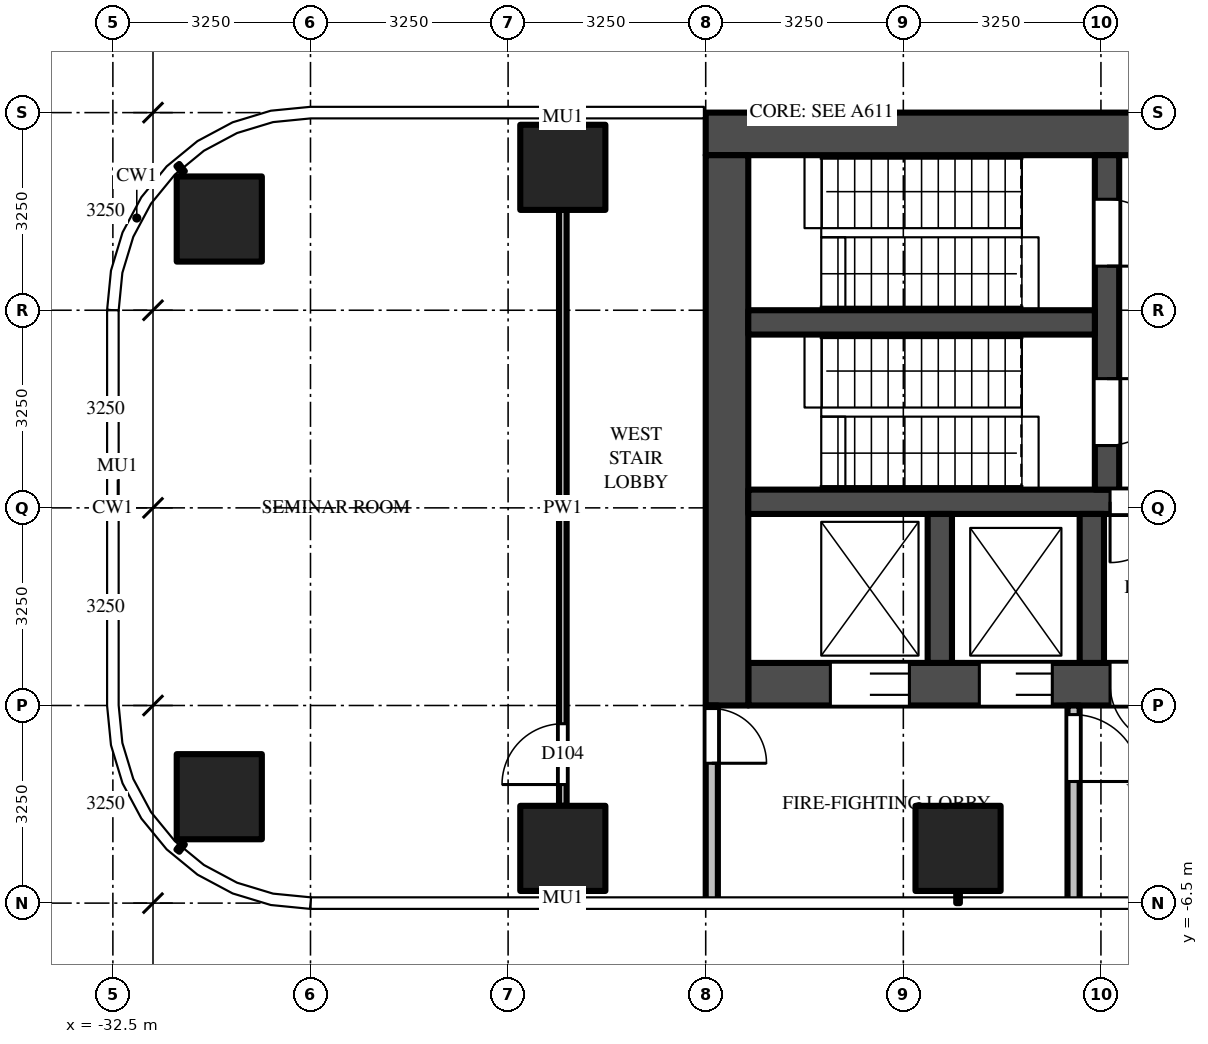
"""IFC4 building model, lengths in metres.
Left out: names, types, materials, properties, quantities, classifications, styles, units other than length and angle.
Written with IfcOpenShell. Run it as: python <this file> out.ifc"""

import sys

from ifc_helpers import new_model, si_unit, direction, frame, frame_2d, origin, origin_2d, place, context, subcontext, project, spatial, rectangle, extrude, source, transform, mapped, element, fill, save


model = new_model("IFC4")
c1 = context("Model", 3, precision=1e-05, world=origin(), true_north=direction((0.0, 1.0)))
c2 = subcontext(c1, "Body", "Model", "MODEL_VIEW")
j1 = project(units=[si_unit("LENGTHUNIT", "METRE"), si_unit("PLANEANGLEUNIT", "RADIAN")], contexts=[c1])
p1 = place(None, origin())
s1 = spatial("IfcSite", under=j1, at=p1, CompositionType="ELEMENT")
p2 = place(p1, origin())
s2 = spatial("IfcBuilding", under=s1, at=p2, CompositionType="ELEMENT")
p3 = place(p2, frame((0.0, 0.0, 88.0)))
s3 = spatial("IfcBuildingStorey", under=s2, at=p3, CompositionType="ELEMENT", Elevation=88.0)
m1 = source(origin(), c2, "Body", "SweptSolid", [
    extrude(rectangle(XDim=1.4, YDim=1.4, at=origin_2d()), origin(), (0.0, 0.0, 1.0), 4.5),
])
for number, where, z_axis, x_axis in (
    (1, (-18.6, -5.6, 0.0), (0.0, 0.0, 1.0), (1.0, 0.0, 0.0)),
    (2, (-25.1, -5.6, 0.0), (0.0, 0.0, 1.0), (1.0, 0.0, 0.0)),
    (3, (-30.75, -4.75, 0.0), (0.0, 0.0, 1.0), (1.0, 0.0, 0.0)),
    (4, (-25.1, 5.6, 0.0), (0.0, 0.0, 1.0), (1.0, 0.0, 0.0)),
    (5, (-30.75, 4.75, 0.0), (0.0, 0.0, 1.0), (1.0, 0.0, 0.0)),
):
    element("IfcColumn", number, at=place(p3, frame(where, z_axis=z_axis, x_axis=x_axis)), inside=s3, PredefinedType="COLUMN", context=c2, shape_type="MappedRepresentation", body=[
        mapped(m1, transform((0.0, 0.0, 0.0))),
    ])
m2 = source(origin(), c2, "Body", "SweptSolid", [
    extrude(rectangle(XDim=16.45, YDim=0.7, at=frame_2d((8.225, 0.0))), origin(), (0.0, 0.0, 1.0), 4.2),
])
p4 = place(p3, frame((-6.3, 6.15, 0.0), z_axis=(0.0, 0.0, 1.0), x_axis=(-1.0, 0.0, 0.0)))
e6 = element("IfcWall", 6, at=p4, inside=s3, PredefinedType="SHEAR", context=c2, shape_type="MappedRepresentation", body=[
    mapped(m2, transform((0.0, 0.0, 0.0))),
])
m3 = source(origin(), c2, "Body", "SweptSolid", [
    extrude(rectangle(XDim=14.85, YDim=0.7, at=frame_2d((7.425, 0.0))), origin(), (0.0, 0.0, 1.0), 4.2),
])
p5 = place(p3, frame((-7.2, -2.9, 0.0), z_axis=(0.0, 0.0, 1.0), x_axis=(-1.0, 0.0, 0.0)))
e7 = element("IfcWall", 7, at=p5, inside=s3, PredefinedType="SHEAR", context=c2, shape_type="MappedRepresentation", body=[
    mapped(m3, transform((0.0, 0.0, 0.0))),
])
m4 = source(origin(), c2, "Body", "SweptSolid", [
    extrude(rectangle(XDim=1.3, YDim=2.1, at=frame_2d((0.65, 1.05))), frame((0.0, 0.36, 0.0), z_axis=(0.0, -1.0, 0.0), x_axis=(1.0, 0.0, 0.0)), (0.0, 0.0, 1.0), 0.72),
])
p6 = place(p5, frame((12.2, 0.0, 0.0)))
e8 = element("IfcOpeningElement", 8, at=p6, cuts=e7, PredefinedType="OPENING", context=c2, shape_type="MappedRepresentation", body=[
    mapped(m4, transform((0.0, 0.0, 0.0))),
])
m5 = source(origin(), c2, "Body", "SweptSolid", [
    extrude(rectangle(XDim=1.2, YDim=2.1, at=frame_2d((0.6, 1.05))), frame((0.0, 0.36, 0.0), z_axis=(0.0, -1.0, 0.0), x_axis=(1.0, 0.0, 0.0)), (0.0, 0.0, 1.0), 0.72),
])
p7 = place(p5, frame((9.85, 0.0, 0.0)))
e9 = element("IfcOpeningElement", 9, at=p7, cuts=e7, PredefinedType="OPENING", context=c2, shape_type="MappedRepresentation", body=[
    mapped(m5, transform((0.0, 0.0, 0.0))),
])
m6 = source(origin(), c2, "Body", "SweptSolid", [
    extrude(rectangle(XDim=1.0, YDim=2.1, at=frame_2d((0.5, 1.05))), frame((0.0, 0.36, 0.0), z_axis=(0.0, -1.0, 0.0), x_axis=(1.0, 0.0, 0.0)), (0.0, 0.0, 1.0), 0.72),
])
p8 = place(p5, frame((7.9, 0.0, 0.0)))
e10 = element("IfcOpeningElement", 10, at=p8, cuts=e7, PredefinedType="OPENING", context=c2, shape_type="MappedRepresentation", body=[
    mapped(m6, transform((0.0, 0.0, 0.0))),
])
p9 = place(p5, frame((0.6, 0.0, 0.0)))
e11 = element("IfcOpeningElement", 11, at=p9, cuts=e7, PredefinedType="OPENING", context=c2, shape_type="MappedRepresentation", body=[
    mapped(m6, transform((0.0, 0.0, 0.0))),
])
m7 = source(origin(), c2, "Body", "SweptSolid", [
    extrude(rectangle(XDim=0.9, YDim=2.1, at=frame_2d((0.45, 1.05))), frame((0.0, 0.36, 0.0), z_axis=(0.0, -1.0, 0.0), x_axis=(1.0, 0.0, 0.0)), (0.0, 0.0, 1.0), 0.72),
])
p10 = place(p5, frame((3.25, 0.0, 0.0)))
e12 = element("IfcOpeningElement", 12, at=p10, cuts=e7, PredefinedType="OPENING", context=c2, shape_type="MappedRepresentation", body=[
    mapped(m7, transform((0.0, 0.0, 0.0))),
])
p11 = place(p5, frame((5.85, 0.0, 0.0)))
e13 = element("IfcOpeningElement", 13, at=p11, cuts=e7, PredefinedType="OPENING", context=c2, shape_type="MappedRepresentation", body=[
    mapped(m7, transform((0.0, 0.0, 0.0))),
])
m8 = source(origin(), c2, "Body", "SweptSolid", [
    extrude(rectangle(XDim=9.05, YDim=0.7, at=frame_2d((4.525, 0.0))), origin(), (0.0, 0.0, 1.0), 4.2),
])
p12 = place(p3, frame((-22.4, 5.8, 0.0), z_axis=(0.0, 0.0, 1.0), x_axis=(0.0, -1.0, 0.0)))
e14 = element("IfcWall", 14, at=p12, inside=s3, PredefinedType="SHEAR", context=c2, shape_type="MappedRepresentation", body=[
    mapped(m8, transform((0.0, 0.0, 0.0))),
])
m9 = source(origin(), c2, "Body", "SweptSolid", [
    extrude(rectangle(XDim=14.85, YDim=0.4, at=frame_2d((7.425, 0.0))), origin(), (0.0, 0.0, 1.0), 4.2),
])
p13 = place(p3, frame((-7.2, 0.1, 0.0), z_axis=(0.0, 0.0, 1.0), x_axis=(-1.0, 0.0, 0.0)))
e15 = element("IfcWall", 15, at=p13, inside=s3, PredefinedType="SHEAR", context=c2, shape_type="MappedRepresentation", body=[
    mapped(m9, transform((0.0, 0.0, 0.0))),
])
m10 = source(origin(), c2, "Body", "SweptSolid", [
    extrude(rectangle(XDim=1.0, YDim=2.1, at=frame_2d((0.5, 1.05))), frame((0.0, 0.21, 0.0), z_axis=(0.0, -1.0, 0.0), x_axis=(1.0, 0.0, 0.0)), (0.0, 0.0, 1.0), 0.42),
])
p14 = place(p13, frame((7.9, 0.0, 0.0)))
e16 = element("IfcOpeningElement", 16, at=p14, cuts=e15, PredefinedType="OPENING", context=c2, shape_type="MappedRepresentation", body=[
    mapped(m10, transform((0.0, 0.0, 0.0))),
])
m11 = source(origin(), c2, "Body", "SweptSolid", [
    extrude(rectangle(XDim=5.5, YDim=0.4, at=frame_2d((2.75, 0.0))), origin(), (0.0, 0.0, 1.0), 4.2),
])
p15 = place(p3, frame((-16.15, 5.8, 0.0), z_axis=(0.0, 0.0, 1.0), x_axis=(0.0, -1.0, 0.0)))
e17 = element("IfcWall", 17, at=p15, inside=s3, PredefinedType="SHEAR", context=c2, shape_type="MappedRepresentation", body=[
    mapped(m11, transform((0.0, 0.0, 0.0))),
])
m12 = source(origin(), c2, "Body", "SweptSolid", [
    extrude(rectangle(XDim=1.1, YDim=2.1, at=frame_2d((0.55, 1.05))), frame((0.0, 0.21, 0.0), z_axis=(0.0, -1.0, 0.0), x_axis=(1.0, 0.0, 0.0)), (0.0, 0.0, 1.0), 0.42),
])
p16 = place(p15, frame((0.725, 0.0, 0.0)))
e18 = element("IfcOpeningElement", 18, at=p16, cuts=e17, PredefinedType="OPENING", context=c2, shape_type="MappedRepresentation", body=[
    mapped(m12, transform((0.0, 0.0, 0.0))),
])
p17 = place(p15, frame((3.675, 0.0, 0.0)))
e19 = element("IfcOpeningElement", 19, at=p17, cuts=e17, PredefinedType="OPENING", context=c2, shape_type="MappedRepresentation", body=[
    mapped(m12, transform((0.0, 0.0, 0.0))),
])
m13 = source(origin(), c2, "Body", "SweptSolid", [
    extrude(rectangle(XDim=5.7, YDim=0.4, at=frame_2d((2.85, 0.0))), origin(), (0.0, 0.0, 1.0), 4.2),
])
p18 = place(p3, frame((-16.35, 3.05, 0.0), z_axis=(0.0, 0.0, 1.0), x_axis=(-1.0, 0.0, 0.0)))
e20 = element("IfcWall", 20, at=p18, inside=s3, PredefinedType="SHEAR", context=c2, shape_type="MappedRepresentation", body=[
    mapped(m13, transform((0.0, 0.0, 0.0))),
])
m14 = source(origin(), c2, "Body", "SweptSolid", [
    extrude(rectangle(XDim=2.45, YDim=0.4, at=frame_2d((1.225, 0.0))), origin(), (0.0, 0.0, 1.0), 4.2),
])
for number, where, z_axis, x_axis in (
    (21, (-16.4, -0.1, 0.0), (0.0, 0.0, 1.0), (0.0, -1.0, 0.0)),
    (22, (-18.9, -0.1, 0.0), (0.0, 0.0, 1.0), (0.0, -1.0, 0.0)),
):
    element("IfcWall", number, at=place(p3, frame(where, z_axis=z_axis, x_axis=x_axis)), inside=s3, PredefinedType="SHEAR", context=c2, shape_type="MappedRepresentation", body=[
        mapped(m14, transform((0.0, 0.0, 0.0))),
    ])
m15 = source(origin(), c2, "Body", "SweptSolid", [
    extrude(rectangle(XDim=3.25, YDim=0.2, at=frame_2d((1.625, 0.0))), origin(), (0.0, 0.0, 1.0), 4.2),
])
p19 = place(p3, frame((-16.7, -3.25, 0.0), z_axis=(0.0, 0.0, 1.0), x_axis=(0.0, -1.0, 0.0)))
e23 = element("IfcWall", 23, at=p19, inside=s3, PredefinedType="PARTITIONING", context=c2, shape_type="MappedRepresentation", body=[
    mapped(m15, transform((0.0, 0.0, 0.0))),
])
m16 = source(origin(), c2, "Body", "SweptSolid", [
    extrude(rectangle(XDim=1.1, YDim=2.1, at=frame_2d((0.55, 1.05))), frame((0.0, 0.11, 0.0), z_axis=(0.0, -1.0, 0.0), x_axis=(1.0, 0.0, 0.0)), (0.0, 0.0, 1.0), 0.22),
])
p20 = place(p19, frame((0.15, 0.0, 0.0)))
e24 = element("IfcOpeningElement", 24, at=p20, cuts=e23, PredefinedType="OPENING", context=c2, shape_type="MappedRepresentation", body=[
    mapped(m16, transform((0.0, 0.0, 0.0))),
])
p21 = place(p3, frame((-22.65, -3.25, 0.0), z_axis=(0.0, 0.0, 1.0), x_axis=(0.0, -1.0, 0.0)))
e25 = element("IfcWall", 25, at=p21, inside=s3, PredefinedType="PARTITIONING", context=c2, shape_type="MappedRepresentation", body=[
    mapped(m15, transform((0.0, 0.0, 0.0))),
])
m17 = source(origin(), c2, "Body", "SweptSolid", [
    extrude(rectangle(XDim=0.9, YDim=2.1, at=frame_2d((0.45, 1.05))), frame((0.0, 0.11, 0.0), z_axis=(0.0, -1.0, 0.0), x_axis=(1.0, 0.0, 0.0)), (0.0, 0.0, 1.0), 0.22),
])
p22 = place(p21, frame((0.05, 0.0, 0.0)))
e26 = element("IfcOpeningElement", 26, at=p22, cuts=e25, PredefinedType="OPENING", context=c2, shape_type="MappedRepresentation", body=[
    mapped(m17, transform((0.0, 0.0, 0.0))),
])
m18 = source(origin(), c2, "Body", "SweptSolid", [
    extrude(rectangle(XDim=9.8, YDim=0.125, at=frame_2d((4.9, 0.0))), origin(), (0.0, 0.0, 1.0), 3.418),
])
p23 = place(p3, frame((-25.1, -4.9, 0.0), z_axis=(0.0, 0.0, 1.0), x_axis=(0.0, 1.0, 0.0)))
e27 = element("IfcWall", 27, at=p23, inside=s3, PredefinedType="PARTITIONING", context=c2, shape_type="MappedRepresentation", body=[
    mapped(m18, transform((0.0, 0.0, 0.0))),
])
m19 = source(origin(), c2, "Body", "SweptSolid", [
    extrude(rectangle(XDim=1.0, YDim=2.1, at=frame_2d((0.5, 1.05))), frame((0.0, 0.073, 0.0), z_axis=(0.0, -1.0, 0.0), x_axis=(1.0, 0.0, 0.0)), (0.0, 0.0, 1.0), 0.145),
])
p24 = place(p23, frame((0.35, 0.0, 0.0)))
e28 = element("IfcOpeningElement", 28, at=p24, cuts=e27, PredefinedType="OPENING", context=c2, shape_type="MappedRepresentation", body=[
    mapped(m19, transform((0.0, 0.0, 0.0))),
])
m20 = source(origin(), c2, "Body", "SweptSolid", [
    extrude(rectangle(XDim=1.3, YDim=2.1, at=frame_2d((0.65, 1.05))), frame((0.0, -0.275, 0.0), z_axis=(0.0, -1.0, 0.0), x_axis=(1.0, 0.0, 0.0)), (0.0, 0.0, 1.0), 0.05),
])
p25 = place(p6, origin())
e29 = element("IfcDoor", 29, at=p25, inside=s3, OperationType="DOUBLE_DOOR_SLIDING", PredefinedType="DOOR", context=c2, shape_type="MappedRepresentation", body=[
    mapped(m20, transform((0.0, 0.0, 0.0))),
])
fill(e8, e29)
m21 = source(origin(), c2, "Body", "SweptSolid", [
    extrude(rectangle(XDim=1.2, YDim=2.1, at=frame_2d((0.6, 1.05))), frame((0.0, -0.275, 0.0), z_axis=(0.0, -1.0, 0.0), x_axis=(1.0, 0.0, 0.0)), (0.0, 0.0, 1.0), 0.05),
])
p26 = place(p7, origin())
e30 = element("IfcDoor", 30, at=p26, inside=s3, OperationType="DOUBLE_DOOR_SLIDING", PredefinedType="DOOR", context=c2, shape_type="MappedRepresentation", body=[
    mapped(m21, transform((0.0, 0.0, 0.0))),
])
fill(e9, e30)
m22 = source(origin(), c2, "Body", "SweptSolid", [
    extrude(rectangle(XDim=1.1, YDim=2.1, at=frame_2d((0.55, 1.05))), frame((0.0, 0.025, 0.0), z_axis=(0.0, -1.0, 0.0), x_axis=(1.0, 0.0, 0.0)), (0.0, 0.0, 1.0), 0.05),
])
p27 = place(p16, origin())
e31 = element("IfcDoor", 31, at=p27, inside=s3, OperationType="SINGLE_SWING_RIGHT", PredefinedType="DOOR", context=c2, shape_type="MappedRepresentation", body=[
    mapped(m22, transform((0.0, 0.0, 0.0))),
])
fill(e18, e31)
p28 = place(p17, origin())
e32 = element("IfcDoor", 32, at=p28, inside=s3, OperationType="SINGLE_SWING_LEFT", PredefinedType="DOOR", context=c2, shape_type="MappedRepresentation", body=[
    mapped(m22, transform((0.0, 0.0, 0.0))),
])
fill(e19, e32)
m23 = source(origin(), c2, "Body", "SweptSolid", [
    extrude(rectangle(XDim=1.0, YDim=2.1, at=frame_2d((0.5, 1.05))), frame((0.0, 0.025, 0.0), z_axis=(0.0, -1.0, 0.0), x_axis=(1.0, 0.0, 0.0)), (0.0, 0.0, 1.0), 0.05),
])
p29 = place(p14, origin())
e33 = element("IfcDoor", 33, at=p29, inside=s3, OperationType="SINGLE_SWING_RIGHT", PredefinedType="DOOR", context=c2, shape_type="MappedRepresentation", body=[
    mapped(m23, transform((0.0, 0.0, 0.0))),
])
fill(e16, e33)
m24 = source(origin(), c2, "Body", "SweptSolid", [
    extrude(rectangle(XDim=1.0, YDim=2.1, at=frame_2d((0.5, 1.05))), frame((0.0, -0.275, 0.0), z_axis=(0.0, -1.0, 0.0), x_axis=(1.0, 0.0, 0.0)), (0.0, 0.0, 1.0), 0.05),
])
p30 = place(p8, origin())
e34 = element("IfcDoor", 34, at=p30, inside=s3, OperationType="SINGLE_SWING_LEFT", PredefinedType="DOOR", context=c2, shape_type="MappedRepresentation", body=[
    mapped(m24, transform((0.0, 0.0, 0.0))),
])
fill(e10, e34)
p31 = place(p20, origin())
e35 = element("IfcDoor", 35, at=p31, inside=s3, OperationType="SINGLE_SWING_RIGHT", PredefinedType="DOOR", context=c2, shape_type="MappedRepresentation", body=[
    mapped(m22, transform((0.0, 0.0, 0.0))),
])
fill(e24, e35)
m25 = source(origin(), c2, "Body", "SweptSolid", [
    extrude(rectangle(XDim=0.9, YDim=2.1, at=frame_2d((0.45, 1.05))), frame((0.0, 0.025, 0.0), z_axis=(0.0, -1.0, 0.0), x_axis=(1.0, 0.0, 0.0)), (0.0, 0.0, 1.0), 0.05),
])
p32 = place(p22, origin())
e36 = element("IfcDoor", 36, at=p32, inside=s3, OperationType="SINGLE_SWING_RIGHT", PredefinedType="DOOR", context=c2, shape_type="MappedRepresentation", body=[
    mapped(m25, transform((0.0, 0.0, 0.0))),
])
fill(e26, e36)
p33 = place(p24, origin())
e37 = element("IfcDoor", 37, at=p33, inside=s3, OperationType="SINGLE_SWING_LEFT", PredefinedType="DOOR", context=c2, shape_type="MappedRepresentation", body=[
    mapped(m23, transform((0.0, 0.0, 0.0))),
])
fill(e28, e37)
save(model, sys.argv[1])
